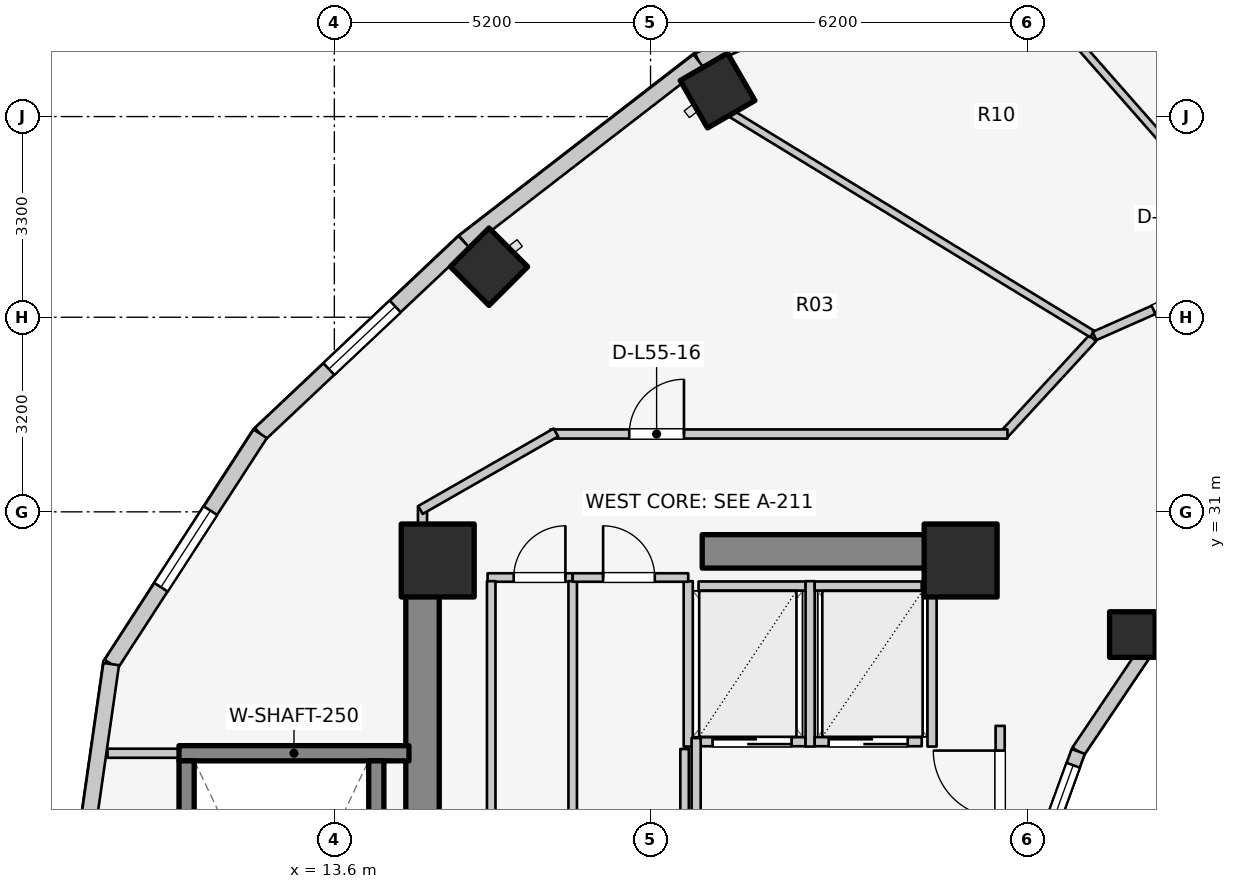
"""IFC4 building model, lengths in metres.
Left out: names, types, materials, properties, quantities, classifications, styles, units other than length and angle.
Written with IfcOpenShell. Run it as: python <this file> out.ifc"""

import sys

from ifc_helpers import new_model, si_unit, direction, frame, frame_2d, origin, origin_2d, place, context, subcontext, project, spatial, rectangle, extrude, element, fill, save


model = new_model("IFC4")
c1 = context("Model", 3, precision=1e-05, world=origin(), true_north=direction((0.0, 1.0)))
c2 = subcontext(c1, "Body", "Model", "MODEL_VIEW")
j1 = project(units=[si_unit("LENGTHUNIT", "METRE"), si_unit("PLANEANGLEUNIT", "RADIAN")], contexts=[c1])
p1 = place(None, origin())
s1 = spatial("IfcSite", under=j1, at=p1, CompositionType="ELEMENT")
p2 = place(p1, origin())
s2 = spatial("IfcBuilding", under=s1, at=p2, CompositionType="ELEMENT")
p3 = place(p2, frame((0.0, 0.0, 180.8)))
s3 = spatial("IfcBuildingStorey", under=s2, at=p3, CompositionType="ELEMENT", Elevation=180.8)
p4 = place(p3, frame((15.05, 17.05, 0.0), z_axis=(0.0, 0.0, 1.0), x_axis=(0.0, 1.0, 0.0)))
e1 = element("IfcWall", 1, at=p4, inside=s3, PredefinedType="SHEAR", context=c2, shape_type="SweptSolid", body=[
    extrude(rectangle(XDim=12.8, YDim=0.55, at=frame_2d((6.4, 0.0))), origin(), (0.0, 0.0, 1.0), 3.1),
])
p5 = place(p3, frame((19.65, 30.35, 0.0), z_axis=(0.0, 0.0, 1.0), x_axis=(1.0, 0.0, 0.0)))
e2 = element("IfcWall", 2, at=p5, inside=s3, PredefinedType="SHEAR", context=c2, shape_type="SweptSolid", body=[
    extrude(rectangle(XDim=4.5, YDim=0.55, at=frame_2d((2.25, 0.0))), origin(), (0.0, 0.0, 1.0), 3.1),
])
p6 = place(p3, frame((11.045, 27.03, 0.0), z_axis=(0.0, 0.0, 1.0), x_axis=(1.0, 0.0, 0.0)))
e3 = element("IfcWall", 3, at=p6, inside=s3, PredefinedType="SOLIDWALL", context=c2, shape_type="SweptSolid", body=[
    extrude(rectangle(XDim=3.782, YDim=0.25, at=frame_2d((1.891, 0.0))), origin(), (0.0, 0.0, 1.0), 3.1),
])
for number, where, z_axis, x_axis in (
    (4, (11.17, 19.095, 0.0), (0.0, 0.0, 1.0), (0.0, 1.0, 0.0)),
    (5, (14.29, 19.095, 0.0), (0.0, 0.0, 1.0), (0.0, 1.0, 0.0)),
):
    element("IfcWall", number, at=place(p3, frame(where, z_axis=z_axis, x_axis=x_axis)), inside=s3, PredefinedType="SOLIDWALL", context=c2, shape_type="SweptSolid", body=[
        extrude(rectangle(XDim=7.81, YDim=0.25, at=frame_2d((3.905, 0.0))), origin(), (0.0, 0.0, 1.0), 3.1),
    ])
for number, where, z_axis, x_axis in (
    (6, (23.9, 30.2, 0.0), (0.0, 0.0, 1.0), (1.0, 0.0, 0.0)),
    (7, (15.3, 30.2, 0.0), (0.0, 0.0, 1.0), (1.0, 0.0, 0.0)),
):
    element("IfcColumn", number, at=place(p3, frame(where, z_axis=z_axis, x_axis=x_axis)), inside=s3, PredefinedType="COLUMN", context=c2, shape_type="SweptSolid", body=[
        extrude(rectangle(XDim=1.2, YDim=1.2, at=origin_2d()), origin(), (0.0, 0.0, 1.0), 3.1),
    ])
p7 = place(p3, frame((19.902, 37.928, 0.0), z_axis=(0.0, 0.0, 1.0), x_axis=(-0.5, 0.866025403784, 0.0)))
e8 = element("IfcColumn", 8, at=p7, inside=s3, PredefinedType="COLUMN", context=c2, shape_type="SweptSolid", body=[
    extrude(rectangle(XDim=0.9, YDim=0.9, at=origin_2d()), origin(), (0.0, 0.0, 1.0), 3.1),
])
p8 = place(p3, frame((26.725, 28.982, 0.0), z_axis=(0.0, 0.0, 1.0), x_axis=(1.0, 0.0, 0.0)))
e9 = element("IfcColumn", 9, at=p8, inside=s3, PredefinedType="COLUMN", context=c2, shape_type="SweptSolid", body=[
    extrude(rectangle(XDim=0.75, YDim=0.75, at=origin_2d()), origin(), (0.0, 0.0, 1.0), 3.1),
])
p9 = place(p3, frame((16.143, 35.031, 0.0), z_axis=(0.0, 0.0, 1.0), x_axis=(-0.707106781187, 0.707106781187, 0.0)))
e10 = element("IfcColumn", 10, at=p9, inside=s3, PredefinedType="COLUMN", context=c2, shape_type="SweptSolid", body=[
    extrude(rectangle(XDim=0.9, YDim=0.9, at=origin_2d()), origin(), (0.0, 0.0, 1.0), 3.1),
])
p10 = place(p3, frame((28.44, 30.032, 0.0), z_axis=(0.0, 0.0, 1.0), x_axis=(-0.752576694707, -0.658504607869, 0.0)))
e11 = element("IfcWall", 11, at=p10, inside=s3, PredefinedType="STANDARD", context=c2, shape_type="SweptSolid", body=[
    extrude(rectangle(XDim=1.959, YDim=0.23, at=frame_2d((0.98, 0.0))), origin(), (0.0, 0.0, 1.0), 2.16),
])
p11 = place(p3, frame((26.965, 28.742, 0.0), z_axis=(0.0, 0.0, 1.0), x_axis=(-0.558197800898, -0.829707909492, 0.0)))
e12 = element("IfcWall", 12, at=p11, inside=s3, PredefinedType="STANDARD", context=c2, shape_type="SweptSolid", body=[
    extrude(rectangle(XDim=2.027, YDim=0.23, at=frame_2d((1.013, 0.0))), origin(), (0.0, 0.0, 1.0), 2.16),
])
p12 = place(p3, frame((25.834, 27.06, 0.0), z_axis=(0.0, 0.0, 1.0), x_axis=(-0.341423187295, -0.93990968033, 0.0)))
e13 = element("IfcWall", 13, at=p12, inside=s3, PredefinedType="STANDARD", context=c2, shape_type="SweptSolid", body=[
    extrude(rectangle(XDim=2.084, YDim=0.23, at=frame_2d((1.042, 0.0))), origin(), (0.0, 0.0, 1.0), 2.84),
])
p13 = place(p12, frame((0.242, 0.0, 0.85)))
e14 = element("IfcOpeningElement", 14, at=p13, cuts=e13, PredefinedType="OPENING", context=c2, shape_type="SweptSolid", body=[
    extrude(rectangle(XDim=1.6, YDim=1.65, at=frame_2d((0.8, 0.825))), frame((0.0, 0.125, 0.0), z_axis=(0.0, -1.0, 0.0), x_axis=(1.0, 0.0, 0.0)), (0.0, 0.0, 1.0), 0.25),
])
p14 = place(p3, frame((24.635, 40.685, 0.0), z_axis=(0.0, 0.0, 1.0), x_axis=(-0.912353637112, -0.409403029847, 0.0)))
e15 = element("IfcWall", 15, at=p14, inside=s3, PredefinedType="STANDARD", context=c2, shape_type="SweptSolid", body=[
    extrude(rectangle(XDim=5.533, YDim=0.26, at=frame_2d((2.766, 0.0))), origin(), (0.0, 0.0, 1.0), 2.85),
])
p15 = place(p14, frame((2.016, 0.0, 0.75)))
e16 = element("IfcOpeningElement", 16, at=p15, cuts=e15, PredefinedType="OPENING", context=c2, shape_type="SweptSolid", body=[
    extrude(rectangle(XDim=1.5, YDim=1.6, at=frame_2d((0.75, 0.8))), frame((0.0, 0.14, 0.0), z_axis=(0.0, -1.0, 0.0), x_axis=(1.0, 0.0, 0.0)), (0.0, 0.0, 1.0), 0.28),
])
p16 = place(p3, frame((19.587, 38.419, 0.0), z_axis=(0.0, 0.0, 1.0), x_axis=(-0.791460185804, -0.611220724687, 0.0)))
e17 = element("IfcWall", 17, at=p16, inside=s3, PredefinedType="STANDARD", context=c2, shape_type="SweptSolid", body=[
    extrude(rectangle(XDim=4.872, YDim=0.26, at=frame_2d((2.436, 0.0))), origin(), (0.0, 0.0, 1.0), 2.85),
])
p17 = place(p3, frame((15.731, 35.441, 0.0), z_axis=(0.0, 0.0, 1.0), x_axis=(-0.727667301037, -0.68593024354, 0.0)))
e18 = element("IfcWall", 18, at=p17, inside=s3, PredefinedType="STANDARD", context=c2, shape_type="SweptSolid", body=[
    extrude(rectangle(XDim=4.604, YDim=0.26, at=frame_2d((2.302, 0.0))), origin(), (0.0, 0.0, 1.0), 2.85),
])
p18 = place(p17, frame((1.552, 0.0, 0.75)))
e19 = element("IfcOpeningElement", 19, at=p18, cuts=e18, PredefinedType="OPENING", context=c2, shape_type="SweptSolid", body=[
    extrude(rectangle(XDim=1.5, YDim=1.6, at=frame_2d((0.75, 0.8))), frame((0.0, 0.14, 0.0), z_axis=(0.0, -1.0, 0.0), x_axis=(1.0, 0.0, 0.0)), (0.0, 0.0, 1.0), 0.28),
])
p19 = place(p3, frame((12.381, 32.284, 0.0), z_axis=(0.0, 0.0, 1.0), x_axis=(-0.543358984534, -0.839500454989, 0.0)))
e20 = element("IfcWall", 20, at=p19, inside=s3, PredefinedType="STANDARD", context=c2, shape_type="SweptSolid", body=[
    extrude(rectangle(XDim=4.511, YDim=0.26, at=frame_2d((2.256, 0.0))), origin(), (0.0, 0.0, 1.0), 2.85),
])
p20 = place(p19, frame((1.506, 0.0, 0.75)))
e21 = element("IfcOpeningElement", 21, at=p20, cuts=e20, PredefinedType="OPENING", context=c2, shape_type="SweptSolid", body=[
    extrude(rectangle(XDim=1.5, YDim=1.6, at=frame_2d((0.75, 0.8))), frame((0.0, 0.14, 0.0), z_axis=(0.0, -1.0, 0.0), x_axis=(1.0, 0.0, 0.0)), (0.0, 0.0, 1.0), 0.28),
])
p21 = place(p3, frame((9.93, 28.497, 0.0), z_axis=(0.0, 0.0, 1.0), x_axis=(-0.142227632286, -0.989833976288, 0.0)))
e22 = element("IfcWall", 22, at=p21, inside=s3, PredefinedType="STANDARD", context=c2, shape_type="SweptSolid", body=[
    extrude(rectangle(XDim=5.553, YDim=0.26, at=frame_2d((2.776, 0.0))), origin(), (0.0, 0.0, 1.0), 2.85),
])
p22 = place(p21, frame((2.892, 0.0, 0.75)))
e23 = element("IfcOpeningElement", 23, at=p22, cuts=e22, PredefinedType="OPENING", context=c2, shape_type="SweptSolid", body=[
    extrude(rectangle(XDim=1.2, YDim=1.5, at=frame_2d((0.6, 0.75))), frame((0.0, 0.14, 0.0), z_axis=(0.0, -1.0, 0.0), x_axis=(1.0, 0.0, 0.0)), (0.0, 0.0, 1.0), 0.28),
])
p23 = place(p3, frame((19.59, 27.22, 0.0), z_axis=(0.0, 0.0, 1.0), x_axis=(1.0, 0.0, 0.0)))
e24 = element("IfcWall", 24, at=p23, inside=s3, PredefinedType="SOLIDWALL", context=c2, shape_type="SweptSolid", body=[
    extrude(rectangle(XDim=1.76, YDim=0.15, at=frame_2d((0.88, 0.0))), origin(), (0.0, 0.0, 1.0), 2.855),
])
p24 = place(p23, frame((0.23, 0.0, 0.0)))
e25 = element("IfcOpeningElement", 25, at=p24, cuts=e24, PredefinedType="OPENING", context=c2, shape_type="SweptSolid", body=[
    extrude(rectangle(XDim=1.3, YDim=2.1, at=frame_2d((0.65, 1.05))), frame((0.0, 0.085, 0.0), z_axis=(0.0, -1.0, 0.0), x_axis=(1.0, 0.0, 0.0)), (0.0, 0.0, 1.0), 0.17),
])
p25 = place(p3, frame((19.59, 29.78, 0.0), z_axis=(0.0, 0.0, 1.0), x_axis=(1.0, 0.0, 0.0)))
e26 = element("IfcWall", 26, at=p25, inside=s3, PredefinedType="SOLIDWALL", context=c2, shape_type="SweptSolid", body=[
    extrude(rectangle(XDim=1.76, YDim=0.15, at=frame_2d((0.88, 0.0))), origin(), (0.0, 0.0, 1.0), 2.855),
])
for number, where, z_axis, x_axis in (
    (27, (19.42, 27.14, 0.0), (0.0, 0.0, 1.0), (0.0, 1.0, 0.0)),
    (28, (21.425, 27.14, 0.0), (0.0, 0.0, 1.0), (0.0, 1.0, 0.0)),
):
    element("IfcWall", number, at=place(p3, frame(where, z_axis=z_axis, x_axis=x_axis)), inside=s3, PredefinedType="SOLIDWALL", context=c2, shape_type="SweptSolid", body=[
        extrude(rectangle(XDim=2.72, YDim=0.15, at=frame_2d((1.36, 0.0))), origin(), (0.0, 0.0, 1.0), 2.855),
    ])
p26 = place(p3, frame((21.5, 27.22, 0.0), z_axis=(0.0, 0.0, 1.0), x_axis=(1.0, 0.0, 0.0)))
e29 = element("IfcWall", 29, at=p26, inside=s3, PredefinedType="SOLIDWALL", context=c2, shape_type="SweptSolid", body=[
    extrude(rectangle(XDim=1.76, YDim=0.15, at=frame_2d((0.88, 0.0))), origin(), (0.0, 0.0, 1.0), 2.855),
])
p27 = place(p26, frame((0.23, 0.0, 0.0)))
e30 = element("IfcOpeningElement", 30, at=p27, cuts=e29, PredefinedType="OPENING", context=c2, shape_type="SweptSolid", body=[
    extrude(rectangle(XDim=1.3, YDim=2.1, at=frame_2d((0.65, 1.05))), frame((0.0, 0.085, 0.0), z_axis=(0.0, -1.0, 0.0), x_axis=(1.0, 0.0, 0.0)), (0.0, 0.0, 1.0), 0.17),
])
p28 = place(p3, frame((21.5, 29.78, 0.0), z_axis=(0.0, 0.0, 1.0), x_axis=(1.0, 0.0, 0.0)))
e31 = element("IfcWall", 31, at=p28, inside=s3, PredefinedType="SOLIDWALL", context=c2, shape_type="SweptSolid", body=[
    extrude(rectangle(XDim=1.76, YDim=0.15, at=frame_2d((0.88, 0.0))), origin(), (0.0, 0.0, 1.0), 2.855),
])
p29 = place(p3, frame((23.43, 27.14, 0.0), z_axis=(0.0, 0.0, 1.0), x_axis=(0.0, 1.0, 0.0)))
e32 = element("IfcWall", 32, at=p29, inside=s3, PredefinedType="SOLIDWALL", context=c2, shape_type="SweptSolid", body=[
    extrude(rectangle(XDim=2.72, YDim=0.15, at=frame_2d((1.36, 0.0))), origin(), (0.0, 0.0, 1.0), 2.855),
])
p30 = place(p3, frame((19.55, 24.08, 0.0), z_axis=(0.0, 0.0, 1.0), x_axis=(0.0, 1.0, 0.0)))
e33 = element("IfcWall", 33, at=p30, inside=s3, PredefinedType="PARTITIONING", context=c2, shape_type="SweptSolid", body=[
    extrude(rectangle(XDim=3.2, YDim=0.15, at=frame_2d((1.6, 0.0))), origin(), (0.0, 0.0, 1.0), 2.855),
])
p31 = place(p3, frame((24.55, 24.08, 0.0), z_axis=(0.0, 0.0, 1.0), x_axis=(0.0, 1.0, 0.0)))
e34 = element("IfcWall", 34, at=p31, inside=s3, PredefinedType="PARTITIONING", context=c2, shape_type="SweptSolid", body=[
    extrude(rectangle(XDim=3.4, YDim=0.15, at=frame_2d((1.7, 0.0))), origin(), (0.0, 0.0, 1.0), 2.855),
])
p32 = place(p31, frame((1.894, 0.0, 0.0)))
e35 = element("IfcOpeningElement", 35, at=p32, cuts=e34, PredefinedType="OPENING", context=c2, shape_type="SweptSolid", body=[
    extrude(rectangle(XDim=1.1, YDim=2.1, at=frame_2d((0.55, 1.05))), frame((0.0, 0.085, 0.0), z_axis=(0.0, -1.0, 0.0), x_axis=(1.0, 0.0, 0.0)), (0.0, 0.0, 1.0), 0.17),
])
p33 = place(p3, frame((16.12, 29.92, 0.0), z_axis=(0.0, 0.0, 1.0), x_axis=(1.0, 0.0, 0.0)))
e36 = element("IfcWall", 36, at=p33, inside=s3, PredefinedType="PLUMBINGWALL", context=c2, shape_type="SweptSolid", body=[
    extrude(rectangle(XDim=1.4, YDim=0.14, at=frame_2d((0.7, 0.0))), origin(), (0.0, 0.0, 1.0), 2.855),
])
p34 = place(p33, frame((0.43, 0.0, 0.0)))
e37 = element("IfcOpeningElement", 37, at=p34, cuts=e36, PredefinedType="OPENING", context=c2, shape_type="SweptSolid", body=[
    extrude(rectangle(XDim=0.85, YDim=2.05, at=frame_2d((0.425, 1.025))), frame((0.0, 0.08, 0.0), z_axis=(0.0, -1.0, 0.0), x_axis=(1.0, 0.0, 0.0)), (0.0, 0.0, 1.0), 0.16),
])
for number, where, z_axis, x_axis in (
    (38, (16.18, 25.98, 0.0), (0.0, 0.0, 1.0), (0.0, 1.0, 0.0)),
    (39, (17.52, 25.98, 0.0), (0.0, 0.0, 1.0), (0.0, 1.0, 0.0)),
):
    element("IfcWall", number, at=place(p3, frame(where, z_axis=z_axis, x_axis=x_axis)), inside=s3, PredefinedType="PLUMBINGWALL", context=c2, shape_type="SweptSolid", body=[
        extrude(rectangle(XDim=3.88, YDim=0.14, at=frame_2d((1.94, 0.0))), origin(), (0.0, 0.0, 1.0), 2.855),
    ])
p35 = place(p3, frame((17.52, 29.92, 0.0), z_axis=(0.0, 0.0, 1.0), x_axis=(1.0, 0.0, 0.0)))
e40 = element("IfcWall", 40, at=p35, inside=s3, PredefinedType="PLUMBINGWALL", context=c2, shape_type="SweptSolid", body=[
    extrude(rectangle(XDim=1.9, YDim=0.14, at=frame_2d((0.95, 0.0))), origin(), (0.0, 0.0, 1.0), 2.855),
])
p36 = place(p35, frame((0.5, 0.0, 0.0)))
e41 = element("IfcOpeningElement", 41, at=p36, cuts=e40, PredefinedType="OPENING", context=c2, shape_type="SweptSolid", body=[
    extrude(rectangle(XDim=0.85, YDim=2.05, at=frame_2d((0.425, 1.025))), frame((0.0, 0.08, 0.0), z_axis=(0.0, -1.0, 0.0), x_axis=(1.0, 0.0, 0.0)), (0.0, 0.0, 1.0), 0.16),
])
p37 = place(p3, frame((19.36, 25.98, 0.0), z_axis=(0.0, 0.0, 1.0), x_axis=(0.0, 1.0, 0.0)))
e42 = element("IfcWall", 42, at=p37, inside=s3, PredefinedType="PLUMBINGWALL", context=c2, shape_type="SweptSolid", body=[
    extrude(rectangle(XDim=1.12, YDim=0.14, at=frame_2d((0.56, 0.0))), origin(), (0.0, 0.0, 1.0), 2.855),
])
p38 = place(p3, frame((9.87, 27.03, 0.0), z_axis=(0.0, 0.0, 1.0), x_axis=(1.0, 0.0, 0.0)))
e43 = element("IfcWall", 43, at=p38, inside=s3, PredefinedType="PARTITIONING", context=c2, shape_type="SweptSolid", body=[
    extrude(rectangle(XDim=1.17, YDim=0.15, at=frame_2d((0.585, 0.0))), origin(), (0.0, 0.0, 1.0), 2.855),
])
p39 = place(p3, frame((15.05, 29.8, 0.0), z_axis=(0.0, 0.0, 1.0), x_axis=(0.0, 1.0, 0.0)))
e44 = element("IfcWall", 44, at=p39, inside=s3, PredefinedType="PARTITIONING", context=c2, shape_type="SweptSolid", body=[
    extrude(rectangle(XDim=1.29, YDim=0.15, at=frame_2d((0.645, 0.0))), origin(), (0.0, 0.0, 1.0), 2.855),
])
p40 = place(p3, frame((26.072, 33.856, 0.0), z_axis=(0.0, 0.0, 1.0), x_axis=(-0.677579737957, -0.735449317567, 0.0)))
e45 = element("IfcWall", 45, at=p40, inside=s3, PredefinedType="PARTITIONING", context=c2, shape_type="SweptSolid", body=[
    extrude(rectangle(XDim=2.173, YDim=0.15, at=frame_2d((1.086, 0.0))), origin(), (0.0, 0.0, 1.0), 2.299),
])
p41 = place(p3, frame((17.15, 32.28, 0.0), z_axis=(0.0, 0.0, 1.0), x_axis=(1.0, 0.0, 0.0)))
e46 = element("IfcWall", 46, at=p41, inside=s3, PredefinedType="PARTITIONING", context=c2, shape_type="SweptSolid", body=[
    extrude(rectangle(XDim=7.52, YDim=0.15, at=frame_2d((3.76, 0.0))), origin(), (0.0, 0.0, 1.0), 2.299),
])
p42 = place(p41, frame((1.3, 0.0, 0.0)))
e47 = element("IfcOpeningElement", 47, at=p42, cuts=e46, PredefinedType="OPENING", context=c2, shape_type="SweptSolid", body=[
    extrude(rectangle(XDim=0.9, YDim=2.1, at=frame_2d((0.45, 1.05))), frame((0.0, 0.085, 0.0), z_axis=(0.0, -1.0, 0.0), x_axis=(1.0, 0.0, 0.0)), (0.0, 0.0, 1.0), 0.17),
])
p43 = place(p3, frame((17.243, 32.305, 0.0), z_axis=(0.0, 0.0, 1.0), x_axis=(-0.867991349648, -0.496579315857, 0.0)))
e48 = element("IfcWall", 48, at=p43, inside=s3, PredefinedType="PARTITIONING", context=c2, shape_type="SweptSolid", body=[
    extrude(rectangle(XDim=2.567, YDim=0.15, at=frame_2d((1.283, 0.0))), origin(), (0.0, 0.0, 1.0), 2.22),
])
p44 = place(p3, frame((28.914, 35.195, 0.0), z_axis=(0.0, 0.0, 1.0), x_axis=(-0.660581320981, 0.750754499401, 0.0)))
e49 = element("IfcWall", 49, at=p44, inside=s3, PredefinedType="PARTITIONING", context=c2, shape_type="SweptSolid", body=[
    extrude(rectangle(XDim=6.027, YDim=0.125, at=frame_2d((3.013, 0.0))), origin(), (0.0, 0.0, 1.0), 2.299),
])
p45 = place(p3, frame((26.062, 33.925, 0.0), z_axis=(0.0, 0.0, 1.0), x_axis=(-0.853440334679, 0.521190555501, 0.0)))
e50 = element("IfcWall", 50, at=p45, inside=s3, PredefinedType="PARTITIONING", context=c2, shape_type="SweptSolid", body=[
    extrude(rectangle(XDim=6.966, YDim=0.125, at=frame_2d((3.483, 0.0))), origin(), (0.0, 0.0, 1.0), 2.299),
])
p46 = place(p3, frame((28.958, 35.156, 0.0), z_axis=(0.0, 0.0, 1.0), x_axis=(-0.914519212393, -0.40454247016, 0.0)))
e51 = element("IfcWall", 51, at=p46, inside=s3, PredefinedType="PARTITIONING", context=c2, shape_type="SweptSolid", body=[
    extrude(rectangle(XDim=3.124, YDim=0.15, at=frame_2d((1.562, 0.0))), origin(), (0.0, 0.0, 1.0), 2.299),
])
p47 = place(p46, frame((1.062, 0.0, 0.0)))
e52 = element("IfcOpeningElement", 52, at=p47, cuts=e51, PredefinedType="OPENING", context=c2, shape_type="SweptSolid", body=[
    extrude(rectangle(XDim=1.0, YDim=2.1, at=frame_2d((0.5, 1.05))), frame((0.0, 0.085, 0.0), z_axis=(0.0, -1.0, 0.0), x_axis=(1.0, 0.0, 0.0)), (0.0, 0.0, 1.0), 0.17),
])
p48 = place(p13, origin())
e53 = element("IfcWindow", 53, at=p48, inside=s3, PartitioningType="SINGLE_PANEL", PredefinedType="WINDOW", context=c2, shape_type="SweptSolid", body=[
    extrude(rectangle(XDim=1.6, YDim=1.65, at=frame_2d((0.8, 0.825))), frame((0.0, 0.03, 0.0), z_axis=(0.0, -1.0, 0.0), x_axis=(1.0, 0.0, 0.0)), (0.0, 0.0, 1.0), 0.06),
])
fill(e14, e53)
p49 = place(p18, origin())
e54 = element("IfcWindow", 54, at=p49, inside=s3, PartitioningType="SINGLE_PANEL", PredefinedType="WINDOW", context=c2, shape_type="SweptSolid", body=[
    extrude(rectangle(XDim=1.5, YDim=1.6, at=frame_2d((0.75, 0.8))), frame((0.0, 0.03, 0.0), z_axis=(0.0, -1.0, 0.0), x_axis=(1.0, 0.0, 0.0)), (0.0, 0.0, 1.0), 0.06),
])
fill(e19, e54)
p50 = place(p20, origin())
e55 = element("IfcWindow", 55, at=p50, inside=s3, PartitioningType="SINGLE_PANEL", PredefinedType="WINDOW", context=c2, shape_type="SweptSolid", body=[
    extrude(rectangle(XDim=1.5, YDim=1.6, at=frame_2d((0.75, 0.8))), frame((0.0, 0.03, 0.0), z_axis=(0.0, -1.0, 0.0), x_axis=(1.0, 0.0, 0.0)), (0.0, 0.0, 1.0), 0.06),
])
fill(e21, e55)
p51 = place(p24, origin())
e56 = element("IfcDoor", 56, at=p51, inside=s3, OperationType="DOUBLE_DOOR_SLIDING", PredefinedType="DOOR", context=c2, shape_type="SweptSolid", body=[
    extrude(rectangle(XDim=1.3, YDim=2.1, at=frame_2d((0.65, 1.05))), frame((0.0, 0.025, 0.0), z_axis=(0.0, -1.0, 0.0), x_axis=(1.0, 0.0, 0.0)), (0.0, 0.0, 1.0), 0.05),
])
fill(e25, e56)
p52 = place(p27, origin())
e57 = element("IfcDoor", 57, at=p52, inside=s3, OperationType="DOUBLE_DOOR_SLIDING", PredefinedType="DOOR", context=c2, shape_type="SweptSolid", body=[
    extrude(rectangle(XDim=1.3, YDim=2.1, at=frame_2d((0.65, 1.05))), frame((0.0, 0.025, 0.0), z_axis=(0.0, -1.0, 0.0), x_axis=(1.0, 0.0, 0.0)), (0.0, 0.0, 1.0), 0.05),
])
fill(e30, e57)
p53 = place(p32, origin())
e58 = element("IfcDoor", 58, at=p53, inside=s3, OperationType="SINGLE_SWING_RIGHT", PredefinedType="DOOR", context=c2, shape_type="SweptSolid", body=[
    extrude(rectangle(XDim=1.1, YDim=2.1, at=frame_2d((0.55, 1.05))), frame((0.0, 0.025, 0.0), z_axis=(0.0, -1.0, 0.0), x_axis=(1.0, 0.0, 0.0)), (0.0, 0.0, 1.0), 0.05),
])
fill(e35, e58)
p54 = place(p34, origin())
e59 = element("IfcDoor", 59, at=p54, inside=s3, OperationType="SINGLE_SWING_RIGHT", PredefinedType="DOOR", context=c2, shape_type="SweptSolid", body=[
    extrude(rectangle(XDim=0.85, YDim=2.05, at=frame_2d((0.425, 1.025))), frame((0.0, 0.025, 0.0), z_axis=(0.0, -1.0, 0.0), x_axis=(1.0, 0.0, 0.0)), (0.0, 0.0, 1.0), 0.05),
])
fill(e37, e59)
p55 = place(p36, origin())
e60 = element("IfcDoor", 60, at=p55, inside=s3, OperationType="SINGLE_SWING_LEFT", PredefinedType="DOOR", context=c2, shape_type="SweptSolid", body=[
    extrude(rectangle(XDim=0.85, YDim=2.05, at=frame_2d((0.425, 1.025))), frame((0.0, 0.025, 0.0), z_axis=(0.0, -1.0, 0.0), x_axis=(1.0, 0.0, 0.0)), (0.0, 0.0, 1.0), 0.05),
])
fill(e41, e60)
p56 = place(p42, origin())
e61 = element("IfcDoor", 61, at=p56, inside=s3, OperationType="SINGLE_SWING_RIGHT", PredefinedType="DOOR", context=c2, shape_type="SweptSolid", body=[
    extrude(rectangle(XDim=0.9, YDim=2.1, at=frame_2d((0.45, 1.05))), frame((0.0, 0.025, 0.0), z_axis=(0.0, -1.0, 0.0), x_axis=(1.0, 0.0, 0.0)), (0.0, 0.0, 1.0), 0.05),
])
fill(e47, e61)
p57 = place(p47, origin())
e62 = element("IfcDoor", 62, at=p57, inside=s3, OperationType="SINGLE_SWING_RIGHT", PredefinedType="DOOR", context=c2, shape_type="SweptSolid", body=[
    extrude(rectangle(XDim=1.0, YDim=2.1, at=frame_2d((0.5, 1.05))), frame((0.0, 0.025, 0.0), z_axis=(0.0, -1.0, 0.0), x_axis=(1.0, 0.0, 0.0)), (0.0, 0.0, 1.0), 0.05),
])
fill(e52, e62)
save(model, sys.argv[1])
